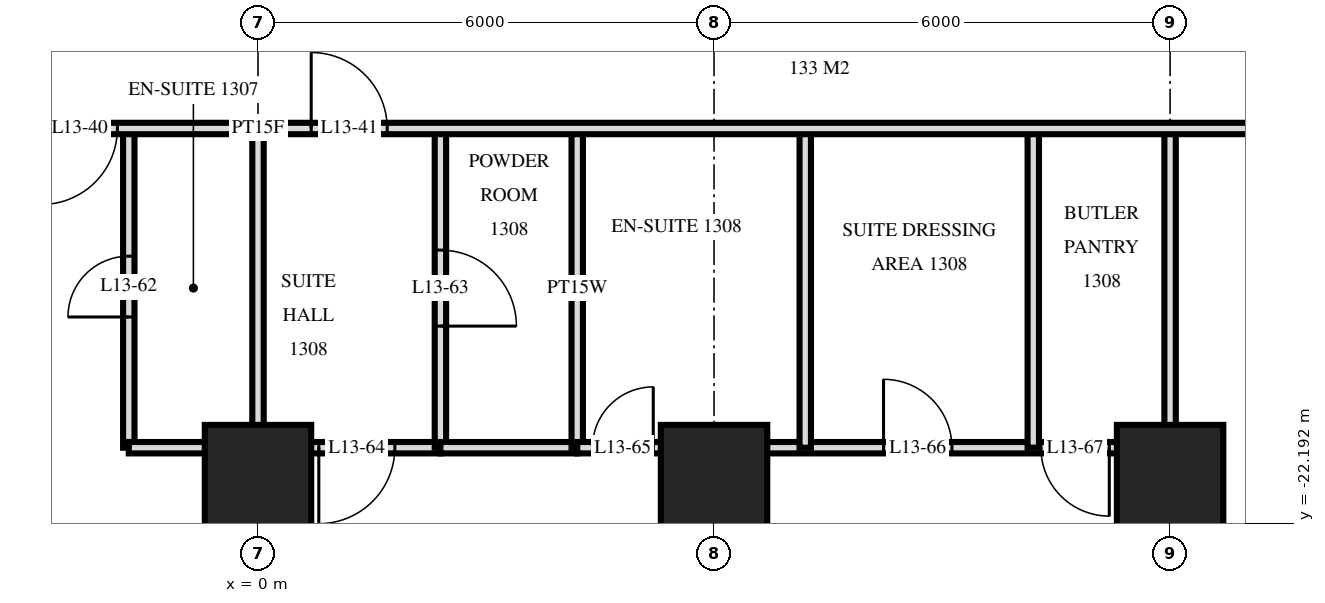
"""IFC4 building model, lengths in metres.
Left out: names, types, materials, properties, quantities, classifications, styles, units other than length and angle.
Written with IfcOpenShell. Run it as: python <this file> out.ifc"""

import sys

from ifc_helpers import new_model, si_unit, direction, frame, frame_2d, origin, origin_2d, place, context, subcontext, project, spatial, rectangle, extrude, element, fill, save


model = new_model("IFC4")
c1 = context("Model", 3, precision=1e-05, world=origin(), true_north=direction((0.0, 1.0)))
c2 = subcontext(c1, "Body", "Model", "MODEL_VIEW")
j1 = project(units=[si_unit("LENGTHUNIT", "METRE"), si_unit("PLANEANGLEUNIT", "RADIAN")], contexts=[c1])
p1 = place(None, origin())
s1 = spatial("IfcSite", under=j1, at=p1, CompositionType="ELEMENT")
p2 = place(p1, origin())
s2 = spatial("IfcBuilding", under=s1, at=p2, CompositionType="ELEMENT")
p3 = place(p2, frame((0.0, 0.0, 56.4)))
s3 = spatial("IfcBuildingStorey", under=s2, at=p3, CompositionType="ELEMENT", Elevation=56.4)
for number, where, z_axis, x_axis in (
    (1, (0.0, -21.6, 0.0), (0.0, 0.0, 1.0), (1.0, 0.0, 0.0)),
    (2, (6.0, -21.6, 0.0), (0.0, 0.0, 1.0), (1.0, 0.0, 0.0)),
    (3, (12.0, -21.6, 0.0), (0.0, 0.0, 1.0), (1.0, 0.0, 0.0)),
):
    element("IfcColumn", number, at=place(p3, frame(where, z_axis=z_axis, x_axis=x_axis)), inside=s3, PredefinedType="COLUMN", context=c2, shape_type="SweptSolid", body=[
        extrude(rectangle(XDim=1.4, YDim=1.4, at=origin_2d()), origin(), (0.0, 0.0, 1.0), 3.6),
    ])
p4 = place(p3, frame((12.0, -29.22, 0.0), z_axis=(0.0, 0.0, 1.0), x_axis=(0.0, 1.0, 0.0)))
e4 = element("IfcWall", 4, at=p4, inside=s3, PredefinedType="PARTITIONING", context=c2, shape_type="SweptSolid", body=[
    extrude(rectangle(XDim=12.22, YDim=0.15, at=frame_2d((6.11, 0.0))), origin(), (0.0, 0.0, 1.0), 3.32),
])
for number, where, z_axis, x_axis in (
    (5, (10.2, -21.2, 0.0), (0.0, 0.0, 1.0), (0.0, 1.0, 0.0)),
    (6, (7.2, -21.2, 0.0), (0.0, 0.0, 1.0), (0.0, 1.0, 0.0)),
):
    element("IfcWall", number, at=place(p3, frame(where, z_axis=z_axis, x_axis=x_axis)), inside=s3, PredefinedType="PARTITIONING", context=c2, shape_type="SweptSolid", body=[
        extrude(rectangle(XDim=4.2, YDim=0.15, at=frame_2d((2.1, 0.0))), origin(), (0.0, 0.0, 1.0), 3.32),
    ])
p5 = place(p3, frame((6.0, -29.22, 0.0), z_axis=(0.0, 0.0, 1.0), x_axis=(0.0, 1.0, 0.0)))
e7 = element("IfcWall", 7, at=p5, inside=s3, PredefinedType="PARTITIONING", context=c2, shape_type="SweptSolid", body=[
    extrude(rectangle(XDim=8.02, YDim=0.15, at=frame_2d((4.01, 0.0))), origin(), (0.0, 0.0, 1.0), 3.32),
])
p6 = place(p5, frame((3.45, 0.0, 0.0)))
e8 = element("IfcOpeningElement", 8, at=p6, cuts=e7, PredefinedType="OPENING", context=c2, shape_type="SweptSolid", body=[
    extrude(rectangle(XDim=0.9, YDim=2.1, at=frame_2d((0.45, 1.05))), frame((0.0, 0.085, 0.0), z_axis=(0.0, -1.0, 0.0), x_axis=(1.0, 0.0, 0.0)), (0.0, 0.0, 1.0), 0.17),
])
p7 = place(p3, frame((4.2, -21.2, 0.0), z_axis=(0.0, 0.0, 1.0), x_axis=(0.0, 1.0, 0.0)))
e9 = element("IfcWall", 9, at=p7, inside=s3, PredefinedType="PLUMBINGWALL", context=c2, shape_type="SweptSolid", body=[
    extrude(rectangle(XDim=4.2, YDim=0.15, at=frame_2d((2.1, 0.0))), origin(), (0.0, 0.0, 1.0), 3.32),
])
p8 = place(p3, frame((2.4, -21.2, 0.0), z_axis=(0.0, 0.0, 1.0), x_axis=(0.0, 1.0, 0.0)))
e10 = element("IfcWall", 10, at=p8, inside=s3, PredefinedType="PARTITIONING", context=c2, shape_type="SweptSolid", body=[
    extrude(rectangle(XDim=4.2, YDim=0.15, at=frame_2d((2.1, 0.0))), origin(), (0.0, 0.0, 1.0), 3.32),
])
p9 = place(p8, frame((1.6, 0.0, 0.0)))
e11 = element("IfcOpeningElement", 11, at=p9, cuts=e10, PredefinedType="OPENING", context=c2, shape_type="SweptSolid", body=[
    extrude(rectangle(XDim=1.0, YDim=2.1, at=frame_2d((0.5, 1.05))), frame((0.0, 0.085, 0.0), z_axis=(0.0, -1.0, 0.0), x_axis=(1.0, 0.0, 0.0)), (0.0, 0.0, 1.0), 0.17),
])
p10 = place(p3, frame((0.0, -21.2, 0.0), z_axis=(0.0, 0.0, 1.0), x_axis=(0.0, 1.0, 0.0)))
e12 = element("IfcWall", 12, at=p10, inside=s3, PredefinedType="PARTITIONING", context=c2, shape_type="SweptSolid", body=[
    extrude(rectangle(XDim=4.2, YDim=0.15, at=frame_2d((2.1, 0.0))), origin(), (0.0, 0.0, 1.0), 3.32),
])
p11 = place(p3, frame((0.0, -29.22, 0.0), z_axis=(0.0, 0.0, 1.0), x_axis=(0.0, 1.0, 0.0)))
e13 = element("IfcWall", 13, at=p11, inside=s3, PredefinedType="PARTITIONING", context=c2, shape_type="SweptSolid", body=[
    extrude(rectangle(XDim=8.02, YDim=0.15, at=frame_2d((4.01, 0.0))), origin(), (0.0, 0.0, 1.0), 3.32),
])
p12 = place(p3, frame((-1.7, -21.2, 0.0), z_axis=(0.0, 0.0, 1.0), x_axis=(0.0, 1.0, 0.0)))
e14 = element("IfcWall", 14, at=p12, inside=s3, PredefinedType="PARTITIONING", context=c2, shape_type="SweptSolid", body=[
    extrude(rectangle(XDim=4.2, YDim=0.15, at=frame_2d((2.1, 0.0))), origin(), (0.0, 0.0, 1.0), 3.32),
])
p13 = place(p12, frame((1.72, 0.0, 0.0)))
e15 = element("IfcOpeningElement", 15, at=p13, cuts=e14, PredefinedType="OPENING", context=c2, shape_type="SweptSolid", body=[
    extrude(rectangle(XDim=0.8, YDim=2.1, at=frame_2d((0.4, 1.05))), frame((0.0, 0.085, 0.0), z_axis=(0.0, -1.0, 0.0), x_axis=(1.0, 0.0, 0.0)), (0.0, 0.0, 1.0), 0.17),
])
p14 = place(p3, frame((0.0, -21.2, 0.0), z_axis=(0.0, 0.0, 1.0), x_axis=(1.0, 0.0, 0.0)))
e16 = element("IfcWall", 16, at=p14, inside=s3, PredefinedType="PARTITIONING", context=c2, shape_type="SweptSolid", body=[
    extrude(rectangle(XDim=2.4, YDim=0.15, at=frame_2d((1.2, 0.0))), origin(), (0.0, 0.0, 1.0), 3.32),
])
p15 = place(p14, frame((0.8, 0.0, 0.0)))
e17 = element("IfcOpeningElement", 17, at=p15, cuts=e16, PredefinedType="OPENING", context=c2, shape_type="SweptSolid", body=[
    extrude(rectangle(XDim=1.0, YDim=2.1, at=frame_2d((0.5, 1.05))), frame((0.0, 0.085, 0.0), z_axis=(0.0, -1.0, 0.0), x_axis=(1.0, 0.0, 0.0)), (0.0, 0.0, 1.0), 0.17),
])
p16 = place(p3, frame((-1.7, -21.2, 0.0), z_axis=(0.0, 0.0, 1.0), x_axis=(1.0, 0.0, 0.0)))
e18 = element("IfcWall", 18, at=p16, inside=s3, PredefinedType="PARTITIONING", context=c2, shape_type="SweptSolid", body=[
    extrude(rectangle(XDim=1.7, YDim=0.15, at=frame_2d((0.85, 0.0))), origin(), (0.0, 0.0, 1.0), 3.32),
])
p17 = place(p3, frame((4.2, -21.2, 0.0), z_axis=(0.0, 0.0, 1.0), x_axis=(1.0, 0.0, 0.0)))
e19 = element("IfcWall", 19, at=p17, inside=s3, PredefinedType="PARTITIONING", context=c2, shape_type="SweptSolid", body=[
    extrude(rectangle(XDim=7.8, YDim=0.15, at=frame_2d((3.9, 0.0))), origin(), (0.0, 0.0, 1.0), 3.32),
])
p18 = place(p17, frame((0.2, 0.0, 0.0)))
e20 = element("IfcOpeningElement", 20, at=p18, cuts=e19, PredefinedType="OPENING", context=c2, shape_type="SweptSolid", body=[
    extrude(rectangle(XDim=0.8, YDim=2.1, at=frame_2d((0.4, 1.05))), frame((0.0, 0.085, 0.0), z_axis=(0.0, -1.0, 0.0), x_axis=(1.0, 0.0, 0.0)), (0.0, 0.0, 1.0), 0.17),
])
p19 = place(p17, frame((4.03, 0.0, 0.0)))
e21 = element("IfcOpeningElement", 21, at=p19, cuts=e19, PredefinedType="OPENING", context=c2, shape_type="SweptSolid", body=[
    extrude(rectangle(XDim=0.9, YDim=2.1, at=frame_2d((0.45, 1.05))), frame((0.0, 0.085, 0.0), z_axis=(0.0, -1.0, 0.0), x_axis=(1.0, 0.0, 0.0)), (0.0, 0.0, 1.0), 0.17),
])
p20 = place(p17, frame((6.1, 0.0, 0.0)))
e22 = element("IfcOpeningElement", 22, at=p20, cuts=e19, PredefinedType="OPENING", context=c2, shape_type="SweptSolid", body=[
    extrude(rectangle(XDim=0.9, YDim=2.1, at=frame_2d((0.45, 1.05))), frame((0.0, 0.085, 0.0), z_axis=(0.0, -1.0, 0.0), x_axis=(1.0, 0.0, 0.0)), (0.0, 0.0, 1.0), 0.17),
])
p21 = place(p3, frame((2.4, -21.2, 0.0), z_axis=(0.0, 0.0, 1.0), x_axis=(1.0, 0.0, 0.0)))
e23 = element("IfcWall", 23, at=p21, inside=s3, PredefinedType="PLUMBINGWALL", context=c2, shape_type="SweptSolid", body=[
    extrude(rectangle(XDim=1.8, YDim=0.15, at=frame_2d((0.9, 0.0))), origin(), (0.0, 0.0, 1.0), 3.32),
])
p22 = place(p3, frame((-33.12, -17.0, 0.0), z_axis=(0.0, 0.0, 1.0), x_axis=(1.0, 0.0, 0.0)))
e24 = element("IfcWall", 24, at=p22, inside=s3, PredefinedType="PARTITIONING", context=c2, shape_type="SweptSolid", body=[
    extrude(rectangle(XDim=66.24, YDim=0.15, at=frame_2d((33.12, 0.0))), origin(), (0.0, 0.0, 1.0), 3.32),
])
p23 = place(p22, frame((12.27, 0.0, 0.0)))
e25 = element("IfcOpeningElement", 25, at=p23, cuts=e24, PredefinedType="OPENING", context=c2, shape_type="SweptSolid", body=[
    extrude(rectangle(XDim=1.0, YDim=2.1, at=frame_2d((0.5, 1.05))), frame((0.0, 0.085, 0.0), z_axis=(0.0, -1.0, 0.0), x_axis=(1.0, 0.0, 0.0)), (0.0, 0.0, 1.0), 0.17),
])
p24 = place(p22, frame((16.97, 0.0, 0.0)))
e26 = element("IfcOpeningElement", 26, at=p24, cuts=e24, PredefinedType="OPENING", context=c2, shape_type="SweptSolid", body=[
    extrude(rectangle(XDim=1.0, YDim=2.1, at=frame_2d((0.5, 1.05))), frame((0.0, 0.085, 0.0), z_axis=(0.0, -1.0, 0.0), x_axis=(1.0, 0.0, 0.0)), (0.0, 0.0, 1.0), 0.17),
])
p25 = place(p22, frame((18.27, 0.0, 0.0)))
e27 = element("IfcOpeningElement", 27, at=p25, cuts=e24, PredefinedType="OPENING", context=c2, shape_type="SweptSolid", body=[
    extrude(rectangle(XDim=1.0, YDim=2.1, at=frame_2d((0.5, 1.05))), frame((0.0, 0.085, 0.0), z_axis=(0.0, -1.0, 0.0), x_axis=(1.0, 0.0, 0.0)), (0.0, 0.0, 1.0), 0.17),
])
p26 = place(p22, frame((22.97, 0.0, 0.0)))
e28 = element("IfcOpeningElement", 28, at=p26, cuts=e24, PredefinedType="OPENING", context=c2, shape_type="SweptSolid", body=[
    extrude(rectangle(XDim=1.0, YDim=2.1, at=frame_2d((0.5, 1.05))), frame((0.0, 0.085, 0.0), z_axis=(0.0, -1.0, 0.0), x_axis=(1.0, 0.0, 0.0)), (0.0, 0.0, 1.0), 0.17),
])
p27 = place(p22, frame((24.27, 0.0, 0.0)))
e29 = element("IfcOpeningElement", 29, at=p27, cuts=e24, PredefinedType="OPENING", context=c2, shape_type="SweptSolid", body=[
    extrude(rectangle(XDim=1.0, YDim=2.1, at=frame_2d((0.5, 1.05))), frame((0.0, 0.085, 0.0), z_axis=(0.0, -1.0, 0.0), x_axis=(1.0, 0.0, 0.0)), (0.0, 0.0, 1.0), 0.17),
])
p28 = place(p22, frame((28.97, 0.0, 0.0)))
e30 = element("IfcOpeningElement", 30, at=p28, cuts=e24, PredefinedType="OPENING", context=c2, shape_type="SweptSolid", body=[
    extrude(rectangle(XDim=1.0, YDim=2.1, at=frame_2d((0.5, 1.05))), frame((0.0, 0.085, 0.0), z_axis=(0.0, -1.0, 0.0), x_axis=(1.0, 0.0, 0.0)), (0.0, 0.0, 1.0), 0.17),
])
p29 = place(p22, frame((30.27, 0.0, 0.0)))
e31 = element("IfcOpeningElement", 31, at=p29, cuts=e24, PredefinedType="OPENING", context=c2, shape_type="SweptSolid", body=[
    extrude(rectangle(XDim=1.0, YDim=2.1, at=frame_2d((0.5, 1.05))), frame((0.0, 0.085, 0.0), z_axis=(0.0, -1.0, 0.0), x_axis=(1.0, 0.0, 0.0)), (0.0, 0.0, 1.0), 0.17),
])
p30 = place(p22, frame((33.82, 0.0, 0.0)))
e32 = element("IfcOpeningElement", 32, at=p30, cuts=e24, PredefinedType="OPENING", context=c2, shape_type="SweptSolid", body=[
    extrude(rectangle(XDim=1.0, YDim=2.1, at=frame_2d((0.5, 1.05))), frame((0.0, 0.085, 0.0), z_axis=(0.0, -1.0, 0.0), x_axis=(1.0, 0.0, 0.0)), (0.0, 0.0, 1.0), 0.17),
])
p31 = place(p22, frame((46.27, 0.0, 0.0)))
e33 = element("IfcOpeningElement", 33, at=p31, cuts=e24, PredefinedType="OPENING", context=c2, shape_type="SweptSolid", body=[
    extrude(rectangle(XDim=1.0, YDim=2.1, at=frame_2d((0.5, 1.05))), frame((0.0, 0.085, 0.0), z_axis=(0.0, -1.0, 0.0), x_axis=(1.0, 0.0, 0.0)), (0.0, 0.0, 1.0), 0.17),
])
p32 = place(p22, frame((52.97, 0.0, 0.0)))
e34 = element("IfcOpeningElement", 34, at=p32, cuts=e24, PredefinedType="OPENING", context=c2, shape_type="SweptSolid", body=[
    extrude(rectangle(XDim=1.0, YDim=2.1, at=frame_2d((0.5, 1.05))), frame((0.0, 0.085, 0.0), z_axis=(0.0, -1.0, 0.0), x_axis=(1.0, 0.0, 0.0)), (0.0, 0.0, 1.0), 0.17),
])
p33 = place(p22, frame((6.05, 0.0, 0.0)))
e35 = element("IfcOpeningElement", 35, at=p33, cuts=e24, PredefinedType="OPENING", context=c2, shape_type="SweptSolid", body=[
    extrude(rectangle(XDim=1.0, YDim=2.1, at=frame_2d((0.5, 1.05))), frame((0.0, 0.085, 0.0), z_axis=(0.0, -1.0, 0.0), x_axis=(1.0, 0.0, 0.0)), (0.0, 0.0, 1.0), 0.17),
])
p34 = place(p22, frame((59.15, 0.0, 0.0)))
e36 = element("IfcOpeningElement", 36, at=p34, cuts=e24, PredefinedType="OPENING", context=c2, shape_type="SweptSolid", body=[
    extrude(rectangle(XDim=1.0, YDim=2.1, at=frame_2d((0.5, 1.05))), frame((0.0, 0.085, 0.0), z_axis=(0.0, -1.0, 0.0), x_axis=(1.0, 0.0, 0.0)), (0.0, 0.0, 1.0), 0.17),
])
p35 = place(p29, frame((0.5, 0.0, 0.0), z_axis=(0.0, 0.0, 1.0), x_axis=(-1.0, 0.0, 0.0)))
e37 = element("IfcDoor", 37, at=p35, inside=s3, OperationType="SINGLE_SWING_LEFT", PredefinedType="DOOR", context=c2, shape_type="SweptSolid", body=[
    extrude(rectangle(XDim=1.0, YDim=2.1, at=frame_2d((0.0, 1.05))), frame((0.0, -0.025, 0.0), z_axis=(0.0, 1.0, 0.0), x_axis=(-1.0, 0.0, 0.0)), (0.0, 0.0, 1.0), 0.05),
])
fill(e31, e37)
p36 = place(p30, origin())
e38 = element("IfcDoor", 38, at=p36, inside=s3, OperationType="SINGLE_SWING_RIGHT", PredefinedType="DOOR", context=c2, shape_type="SweptSolid", body=[
    extrude(rectangle(XDim=1.0, YDim=2.1, at=frame_2d((0.5, 1.05))), frame((0.0, 0.025, 0.0), z_axis=(0.0, -1.0, 0.0), x_axis=(1.0, 0.0, 0.0)), (0.0, 0.0, 1.0), 0.05),
])
fill(e32, e38)
p37 = place(p13, origin())
e39 = element("IfcDoor", 39, at=p37, inside=s3, OperationType="SINGLE_SWING_RIGHT", PredefinedType="DOOR", context=c2, shape_type="SweptSolid", body=[
    extrude(rectangle(XDim=0.8, YDim=2.1, at=frame_2d((0.4, 1.05))), frame((0.0, 0.025, 0.0), z_axis=(0.0, -1.0, 0.0), x_axis=(1.0, 0.0, 0.0)), (0.0, 0.0, 1.0), 0.05),
])
fill(e15, e39)
p38 = place(p9, frame((0.5, 0.0, 0.0), z_axis=(0.0, 0.0, 1.0), x_axis=(-1.0, 0.0, 0.0)))
e40 = element("IfcDoor", 40, at=p38, inside=s3, OperationType="SINGLE_SWING_LEFT", PredefinedType="DOOR", context=c2, shape_type="SweptSolid", body=[
    extrude(rectangle(XDim=1.0, YDim=2.1, at=frame_2d((0.0, 1.05))), frame((0.0, -0.025, 0.0), z_axis=(0.0, 1.0, 0.0), x_axis=(-1.0, 0.0, 0.0)), (0.0, 0.0, 1.0), 0.05),
])
fill(e11, e40)
p39 = place(p15, frame((0.5, 0.0, 0.0), z_axis=(0.0, 0.0, 1.0), x_axis=(-1.0, 0.0, 0.0)))
e41 = element("IfcDoor", 41, at=p39, inside=s3, OperationType="SINGLE_SWING_LEFT", PredefinedType="DOOR", context=c2, shape_type="SweptSolid", body=[
    extrude(rectangle(XDim=1.0, YDim=2.1, at=frame_2d((0.0, 1.05))), frame((0.0, -0.025, 0.0), z_axis=(0.0, 1.0, 0.0), x_axis=(-1.0, 0.0, 0.0)), (0.0, 0.0, 1.0), 0.05),
])
fill(e17, e41)
p40 = place(p18, origin())
e42 = element("IfcDoor", 42, at=p40, inside=s3, OperationType="SINGLE_SWING_LEFT", PredefinedType="DOOR", context=c2, shape_type="SweptSolid", body=[
    extrude(rectangle(XDim=0.8, YDim=2.1, at=frame_2d((0.4, 1.05))), frame((0.0, 0.025, 0.0), z_axis=(0.0, -1.0, 0.0), x_axis=(1.0, 0.0, 0.0)), (0.0, 0.0, 1.0), 0.05),
])
fill(e20, e42)
p41 = place(p19, origin())
e43 = element("IfcDoor", 43, at=p41, inside=s3, OperationType="SINGLE_SWING_RIGHT", PredefinedType="DOOR", context=c2, shape_type="SweptSolid", body=[
    extrude(rectangle(XDim=0.9, YDim=2.1, at=frame_2d((0.45, 1.05))), frame((0.0, 0.025, 0.0), z_axis=(0.0, -1.0, 0.0), x_axis=(1.0, 0.0, 0.0)), (0.0, 0.0, 1.0), 0.05),
])
fill(e21, e43)
p42 = place(p20, frame((0.45, 0.0, 0.0), z_axis=(0.0, 0.0, 1.0), x_axis=(-1.0, 0.0, 0.0)))
e44 = element("IfcDoor", 44, at=p42, inside=s3, OperationType="SINGLE_SWING_RIGHT", PredefinedType="DOOR", context=c2, shape_type="SweptSolid", body=[
    extrude(rectangle(XDim=0.9, YDim=2.1, at=frame_2d((0.0, 1.05))), frame((0.0, -0.025, 0.0), z_axis=(0.0, 1.0, 0.0), x_axis=(-1.0, 0.0, 0.0)), (0.0, 0.0, 1.0), 0.05),
])
fill(e22, e44)
save(model, sys.argv[1])
